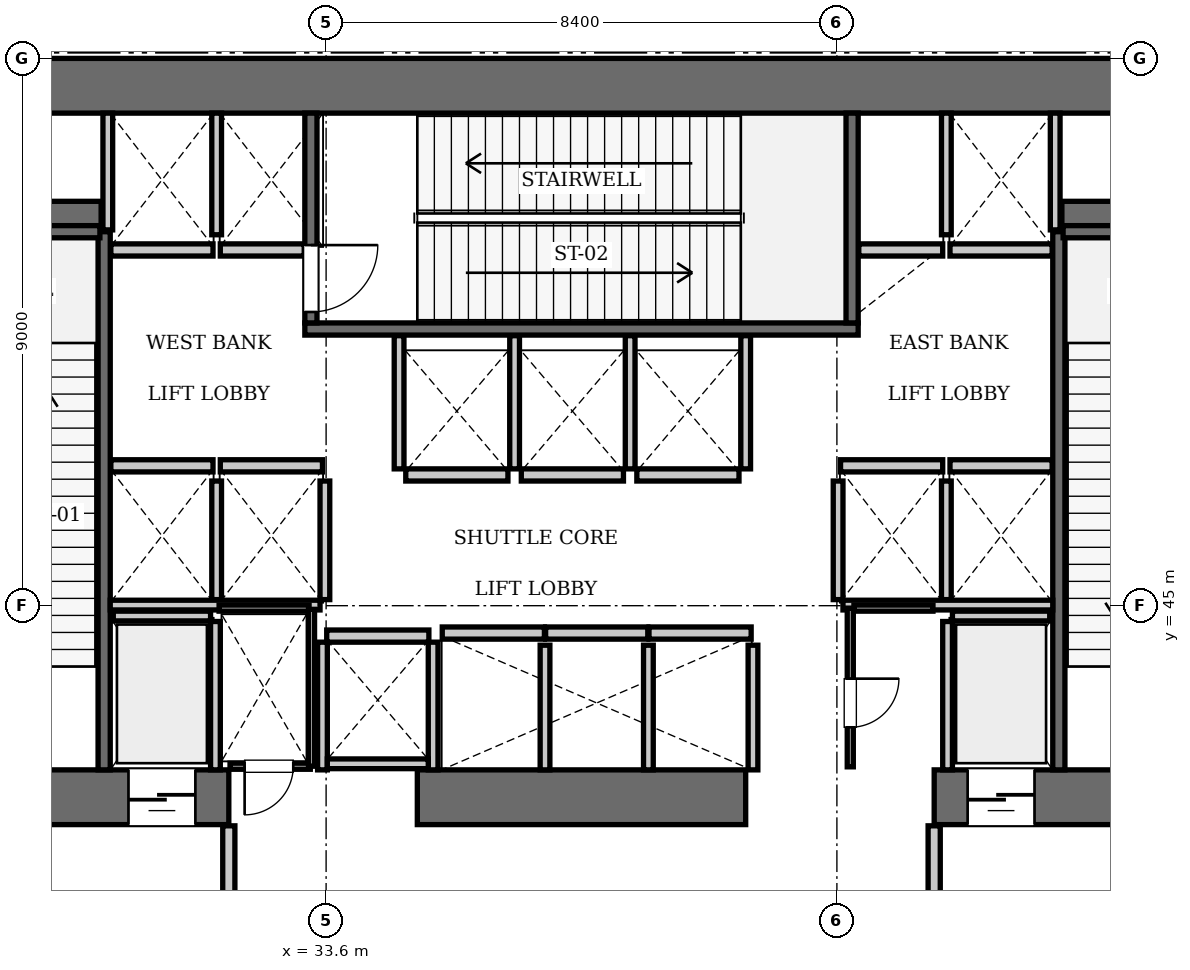
"""IFC4 building model, lengths in metres.
Left out: names, types, materials, properties, quantities, classifications, styles, units other than length and angle.
Written with IfcOpenShell. Run it as: python <this file> out.ifc"""

import sys

from ifc_helpers import new_model, si_unit, direction, frame, frame_2d, origin, place, context, subcontext, project, spatial, rectangle, extrude, element, fill, save


model = new_model("IFC4")
c1 = context("Model", 3, precision=1e-05, world=origin(), true_north=direction((0.0, 1.0)))
c2 = subcontext(c1, "Body", "Model", "MODEL_VIEW")
j1 = project(units=[si_unit("LENGTHUNIT", "METRE"), si_unit("PLANEANGLEUNIT", "RADIAN")], contexts=[c1])
p1 = place(None, origin())
s1 = spatial("IfcSite", under=j1, at=p1, CompositionType="ELEMENT")
p2 = place(p1, origin())
s2 = spatial("IfcBuilding", under=s1, at=p2, CompositionType="ELEMENT")
p3 = place(p2, frame((0.0, 0.0, 115.5)))
s3 = spatial("IfcBuildingStorey", under=s2, at=p3, CompositionType="ELEMENT", Elevation=115.5)
p4 = place(p3, frame((25.2, 53.55, 0.0), z_axis=(0.0, 0.0, 1.0), x_axis=(1.0, 0.0, 0.0)))
e1 = element("IfcWall", 1, at=p4, inside=s3, PredefinedType="SHEAR", context=c2, shape_type="SweptSolid", body=[
    extrude(rectangle(XDim=25.2, YDim=0.9, at=frame_2d((12.6, 0.0))), origin(), (0.0, 0.0, 1.0), 7.0),
])
p5 = place(p3, frame((25.2, 41.85, 0.0), z_axis=(0.0, 0.0, 1.0), x_axis=(1.0, 0.0, 0.0)))
e2 = element("IfcWall", 2, at=p5, inside=s3, PredefinedType="SHEAR", context=c2, shape_type="SweptSolid", body=[
    extrude(rectangle(XDim=6.8, YDim=0.9, at=frame_2d((3.4, 0.0))), origin(), (0.0, 0.0, 1.0), 7.0),
])
p6 = place(p5, frame((1.65, 0.0, 0.0)))
e3 = element("IfcOpeningElement", 3, at=p6, cuts=e2, PredefinedType="OPENING", context=c2, shape_type="SweptSolid", body=[
    extrude(rectangle(XDim=1.15, YDim=2.15, at=frame_2d((0.575, 1.075))), frame((0.0, 0.46, 0.0), z_axis=(0.0, -1.0, 0.0), x_axis=(1.0, 0.0, 0.0)), (0.0, 0.0, 1.0), 0.92),
])
p7 = place(p5, frame((5.15, 0.0, 0.0)))
e4 = element("IfcOpeningElement", 4, at=p7, cuts=e2, PredefinedType="OPENING", context=c2, shape_type="SweptSolid", body=[
    extrude(rectangle(XDim=1.1, YDim=2.2, at=frame_2d((0.55, 1.1))), frame((0.0, 0.46, 0.0), z_axis=(0.0, -1.0, 0.0), x_axis=(1.0, 0.0, 0.0)), (0.0, 0.0, 1.0), 0.92),
])
p8 = place(p3, frame((35.1, 41.85, 0.0), z_axis=(0.0, 0.0, 1.0), x_axis=(1.0, 0.0, 0.0)))
e5 = element("IfcWall", 5, at=p8, inside=s3, PredefinedType="SHEAR", context=c2, shape_type="SweptSolid", body=[
    extrude(rectangle(XDim=5.4, YDim=0.9, at=frame_2d((2.7, 0.0))), origin(), (0.0, 0.0, 1.0), 7.0),
])
p9 = place(p3, frame((43.6, 41.85, 0.0), z_axis=(0.0, 0.0, 1.0), x_axis=(1.0, 0.0, 0.0)))
e6 = element("IfcWall", 6, at=p9, inside=s3, PredefinedType="SHEAR", context=c2, shape_type="SweptSolid", body=[
    extrude(rectangle(XDim=6.8, YDim=0.9, at=frame_2d((3.4, 0.0))), origin(), (0.0, 0.0, 1.0), 7.0),
])
p10 = place(p9, frame((3.9, 0.0, 0.0)))
e7 = element("IfcOpeningElement", 7, at=p10, cuts=e6, PredefinedType="OPENING", context=c2, shape_type="SweptSolid", body=[
    extrude(rectangle(XDim=1.15, YDim=2.15, at=frame_2d((0.575, 1.075))), frame((0.0, 0.46, 0.0), z_axis=(0.0, -1.0, 0.0), x_axis=(1.0, 0.0, 0.0)), (0.0, 0.0, 1.0), 0.92),
])
p11 = place(p9, frame((0.55, 0.0, 0.0)))
e8 = element("IfcOpeningElement", 8, at=p11, cuts=e6, PredefinedType="OPENING", context=c2, shape_type="SweptSolid", body=[
    extrude(rectangle(XDim=1.1, YDim=2.2, at=frame_2d((0.55, 1.1))), frame((0.0, 0.46, 0.0), z_axis=(0.0, -1.0, 0.0), x_axis=(1.0, 0.0, 0.0)), (0.0, 0.0, 1.0), 0.92),
])
p12 = place(p3, frame((26.1, 51.4, 0.0), z_axis=(0.0, 0.0, 1.0), x_axis=(1.0, 0.0, 0.0)))
e9 = element("IfcWall", 9, at=p12, inside=s3, PredefinedType="SHEAR", context=c2, shape_type="SweptSolid", body=[
    extrude(rectangle(XDim=3.8, YDim=0.5, at=frame_2d((1.9, 0.0))), origin(), (0.0, 0.0, 1.0), 7.0),
])
p13 = place(p3, frame((45.7, 51.4, 0.0), z_axis=(0.0, 0.0, 1.0), x_axis=(1.0, 0.0, 0.0)))
e10 = element("IfcWall", 10, at=p13, inside=s3, PredefinedType="SHEAR", context=c2, shape_type="SweptSolid", body=[
    extrude(rectangle(XDim=3.8, YDim=0.5, at=frame_2d((1.9, 0.0))), origin(), (0.0, 0.0, 1.0), 7.0),
])
p14 = place(p3, frame((29.95, 42.3, 0.0), z_axis=(0.0, 0.0, 1.0), x_axis=(0.0, 1.0, 0.0)))
e11 = element("IfcWall", 11, at=p14, inside=s3, PredefinedType="SOLIDWALL", context=c2, shape_type="SweptSolid", body=[
    extrude(rectangle(XDim=8.85, YDim=0.2, at=frame_2d((4.425, 0.0))), origin(), (0.0, 0.0, 1.0), 6.76),
])
p15 = place(p3, frame((26.38, 51.15, 0.0), z_axis=(0.0, 0.0, 1.0), x_axis=(1.0, 0.0, 0.0)))
e12 = element("IfcWall", 12, at=p15, inside=s3, PredefinedType="SOLIDWALL", context=c2, shape_type="SweptSolid", body=[
    extrude(rectangle(XDim=3.5, YDim=0.2, at=frame_2d((1.75, 0.0))), origin(), (0.0, 0.0, 1.0), 6.76),
])
p16 = place(p3, frame((33.25, 49.55, 0.0), z_axis=(0.0, 0.0, 1.0), x_axis=(1.0, 0.0, 0.0)))
e13 = element("IfcWall", 13, at=p16, inside=s3, PredefinedType="SOLIDWALL", context=c2, shape_type="SweptSolid", body=[
    extrude(rectangle(XDim=9.1, YDim=0.2, at=frame_2d((4.55, 0.0))), origin(), (0.0, 0.0, 1.0), 6.76),
])
p17 = place(p3, frame((42.25, 49.65, 0.0), z_axis=(0.0, 0.0, 1.0), x_axis=(0.0, 1.0, 0.0)))
e14 = element("IfcWall", 14, at=p17, inside=s3, PredefinedType="SOLIDWALL", context=c2, shape_type="SweptSolid", body=[
    extrude(rectangle(XDim=3.45, YDim=0.2, at=frame_2d((1.725, 0.0))), origin(), (0.0, 0.0, 1.0), 6.76),
])
p18 = place(p3, frame((33.35, 49.65, 0.0), z_axis=(0.0, 0.0, 1.0), x_axis=(0.0, 1.0, 0.0)))
e15 = element("IfcWall", 15, at=p18, inside=s3, PredefinedType="SOLIDWALL", context=c2, shape_type="SweptSolid", body=[
    extrude(rectangle(XDim=3.45, YDim=0.2, at=frame_2d((1.725, 0.0))), origin(), (0.0, 0.0, 1.0), 6.76),
])
p19 = place(p18, frame((0.18, 0.0, 0.0)))
e16 = element("IfcOpeningElement", 16, at=p19, cuts=e15, PredefinedType="OPENING", context=c2, shape_type="SweptSolid", body=[
    extrude(rectangle(XDim=1.1, YDim=2.15, at=frame_2d((0.55, 1.075))), frame((0.0, 0.11, 0.0), z_axis=(0.0, -1.0, 0.0), x_axis=(1.0, 0.0, 0.0)), (0.0, 0.0, 1.0), 0.22),
])
p20 = place(p3, frame((45.65, 42.3, 0.0), z_axis=(0.0, 0.0, 1.0), x_axis=(0.0, 1.0, 0.0)))
e17 = element("IfcWall", 17, at=p20, inside=s3, PredefinedType="SOLIDWALL", context=c2, shape_type="SweptSolid", body=[
    extrude(rectangle(XDim=8.85, YDim=0.2, at=frame_2d((4.425, 0.0))), origin(), (0.0, 0.0, 1.0), 6.76),
])
p21 = place(p3, frame((45.72, 51.15, 0.0), z_axis=(0.0, 0.0, 1.0), x_axis=(1.0, 0.0, 0.0)))
e18 = element("IfcWall", 18, at=p21, inside=s3, PredefinedType="SOLIDWALL", context=c2, shape_type="SweptSolid", body=[
    extrude(rectangle(XDim=3.5, YDim=0.2, at=frame_2d((1.75, 0.0))), origin(), (0.0, 0.0, 1.0), 6.76),
])
for number, where, z_axis, x_axis in (
    (19, (30.06, 47.3, 0.0), (0.0, 0.0, 1.0), (1.0, 0.0, 0.0)),
    (20, (31.86, 47.3, 0.0), (0.0, 0.0, 1.0), (1.0, 0.0, 0.0)),
    (21, (30.06, 50.85, 0.0), (0.0, 0.0, 1.0), (1.0, 0.0, 0.0)),
):
    element("IfcWall", number, at=place(p3, frame(where, z_axis=z_axis, x_axis=x_axis)), inside=s3, PredefinedType="SOLIDWALL", context=c2, shape_type="SweptSolid", body=[
        extrude(rectangle(XDim=1.68, YDim=0.2, at=frame_2d((0.84, 0.0))), origin(), (0.0, 0.0, 1.0), 6.76),
    ])
p22 = place(p3, frame((31.86, 50.85, 0.0), z_axis=(0.0, 0.0, 1.0), x_axis=(1.0, 0.0, 0.0)))
e22 = element("IfcWall", 22, at=p22, inside=s3, PredefinedType="SOLIDWALL", context=c2, shape_type="SweptSolid", body=[
    extrude(rectangle(XDim=1.38, YDim=0.2, at=frame_2d((0.69, 0.0))), origin(), (0.0, 0.0, 1.0), 6.76),
])
for number, where, z_axis, x_axis in (
    (23, (42.06, 47.3, 0.0), (0.0, 0.0, 1.0), (1.0, 0.0, 0.0)),
    (24, (43.86, 47.3, 0.0), (0.0, 0.0, 1.0), (1.0, 0.0, 0.0)),
):
    element("IfcWall", number, at=place(p3, frame(where, z_axis=z_axis, x_axis=x_axis)), inside=s3, PredefinedType="SOLIDWALL", context=c2, shape_type="SweptSolid", body=[
        extrude(rectangle(XDim=1.68, YDim=0.2, at=frame_2d((0.84, 0.0))), origin(), (0.0, 0.0, 1.0), 6.76),
    ])
p23 = place(p3, frame((42.36, 50.85, 0.0), z_axis=(0.0, 0.0, 1.0), x_axis=(1.0, 0.0, 0.0)))
e25 = element("IfcWall", 25, at=p23, inside=s3, PredefinedType="SOLIDWALL", context=c2, shape_type="SweptSolid", body=[
    extrude(rectangle(XDim=1.38, YDim=0.2, at=frame_2d((0.69, 0.0))), origin(), (0.0, 0.0, 1.0), 6.76),
])
for number, where, z_axis, x_axis in (
    (26, (43.86, 50.85, 0.0), (0.0, 0.0, 1.0), (1.0, 0.0, 0.0)),
    (27, (35.51, 44.55, 0.0), (0.0, 0.0, 1.0), (1.0, 0.0, 0.0)),
    (28, (37.21, 44.55, 0.0), (0.0, 0.0, 1.0), (1.0, 0.0, 0.0)),
):
    element("IfcWall", number, at=place(p3, frame(where, z_axis=z_axis, x_axis=x_axis)), inside=s3, PredefinedType="SOLIDWALL", context=c2, shape_type="SweptSolid", body=[
        extrude(rectangle(XDim=1.68, YDim=0.2, at=frame_2d((0.84, 0.0))), origin(), (0.0, 0.0, 1.0), 6.76),
    ])
for number, where, z_axis, x_axis in (
    (29, (38.91, 44.55, 0.0), (0.0, 0.0, 1.0), (1.0, 0.0, 0.0)),
    (30, (34.91, 47.15, 0.0), (0.0, 0.0, 1.0), (1.0, 0.0, 0.0)),
):
    element("IfcWall", number, at=place(p3, frame(where, z_axis=z_axis, x_axis=x_axis)), inside=s3, PredefinedType="SOLIDWALL", context=c2, shape_type="SweptSolid", body=[
        extrude(rectangle(XDim=1.68, YDim=0.2, at=frame_2d((0.84, 0.0))), origin(), (0.0, 0.0, 1.0), 6.76),
    ])
for number, where, z_axis, x_axis in (
    (31, (36.81, 47.15, 0.0), (0.0, 0.0, 1.0), (1.0, 0.0, 0.0)),
    (32, (38.71, 47.15, 0.0), (0.0, 0.0, 1.0), (1.0, 0.0, 0.0)),
    (33, (33.61, 44.5, 0.0), (0.0, 0.0, 1.0), (1.0, 0.0, 0.0)),
):
    element("IfcWall", number, at=place(p3, frame(where, z_axis=z_axis, x_axis=x_axis)), inside=s3, PredefinedType="SOLIDWALL", context=c2, shape_type="SweptSolid", body=[
        extrude(rectangle(XDim=1.68, YDim=0.2, at=frame_2d((0.84, 0.0))), origin(), (0.0, 0.0, 1.0), 6.76),
    ])
p24 = place(p3, frame((30.1, 44.83, 0.0), z_axis=(0.0, 0.0, 1.0), x_axis=(1.0, 0.0, 0.0)))
e34 = element("IfcWall", 34, at=p24, inside=s3, PredefinedType="SOLIDWALL", context=c2, shape_type="SweptSolid", body=[
    extrude(rectangle(XDim=1.6, YDim=0.16, at=frame_2d((0.8, 0.0))), origin(), (0.0, 0.0, 1.0), 6.76),
])
p25 = place(p3, frame((31.78, 42.3, 0.0), z_axis=(0.0, 0.0, 1.0), x_axis=(0.0, 1.0, 0.0)))
e35 = element("IfcWall", 35, at=p25, inside=s3, PredefinedType="SOLIDWALL", context=c2, shape_type="SweptSolid", body=[
    extrude(rectangle(XDim=2.44, YDim=0.16, at=frame_2d((1.22, 0.0))), origin(), (0.0, 0.0, 1.0), 6.76),
])
p26 = place(p3, frame((43.9, 44.83, 0.0), z_axis=(0.0, 0.0, 1.0), x_axis=(1.0, 0.0, 0.0)))
e36 = element("IfcWall", 36, at=p26, inside=s3, PredefinedType="SOLIDWALL", context=c2, shape_type="SweptSolid", body=[
    extrude(rectangle(XDim=1.6, YDim=0.16, at=frame_2d((0.8, 0.0))), origin(), (0.0, 0.0, 1.0), 6.76),
])
p27 = place(p3, frame((43.82, 42.3, 0.0), z_axis=(0.0, 0.0, 1.0), x_axis=(0.0, 1.0, 0.0)))
e37 = element("IfcWall", 37, at=p27, inside=s3, PredefinedType="SOLIDWALL", context=c2, shape_type="SweptSolid", body=[
    extrude(rectangle(XDim=2.44, YDim=0.16, at=frame_2d((1.22, 0.0))), origin(), (0.0, 0.0, 1.0), 6.76),
])
for number, where, z_axis, x_axis in (
    (38, (31.8, 45.1, 0.0), (0.0, 0.0, 1.0), (0.0, 1.0, 0.0)),
    (39, (33.58, 45.1, 0.0), (0.0, 0.0, 1.0), (0.0, 1.0, 0.0)),
):
    element("IfcWall", number, at=place(p3, frame(where, z_axis=z_axis, x_axis=x_axis)), inside=s3, PredefinedType="SOLIDWALL", context=c2, shape_type="SweptSolid", body=[
        extrude(rectangle(XDim=1.95, YDim=0.16, at=frame_2d((0.975, 0.0))), origin(), (0.0, 0.0, 1.0), 6.76),
    ])
p28 = place(p3, frame((30.05, 45.01, 0.0), z_axis=(0.0, 0.0, 1.0), x_axis=(1.0, 0.0, 0.0)))
e40 = element("IfcWall", 40, at=p28, inside=s3, PredefinedType="SOLIDWALL", context=c2, shape_type="SweptSolid", body=[
    extrude(rectangle(XDim=3.45, YDim=0.16, at=frame_2d((1.725, 0.0))), origin(), (0.0, 0.0, 1.0), 6.76),
])
p29 = place(p3, frame((30.01, 51.18, 0.0), z_axis=(0.0, 0.0, 1.0), x_axis=(0.0, 1.0, 0.0)))
e41 = element("IfcWall", 41, at=p29, inside=s3, PredefinedType="SOLIDWALL", context=c2, shape_type="SweptSolid", body=[
    extrude(rectangle(XDim=1.92, YDim=0.16, at=frame_2d((0.96, 0.0))), origin(), (0.0, 0.0, 1.0), 6.76),
])
p30 = place(p3, frame((31.8, 51.1, 0.0), z_axis=(0.0, 0.0, 1.0), x_axis=(0.0, 1.0, 0.0)))
e42 = element("IfcWall", 42, at=p30, inside=s3, PredefinedType="SOLIDWALL", context=c2, shape_type="SweptSolid", body=[
    extrude(rectangle(XDim=2.0, YDim=0.16, at=frame_2d((1.0, 0.0))), origin(), (0.0, 0.0, 1.0), 6.76),
])
for number, where, z_axis, x_axis in (
    (43, (42.02, 45.1, 0.0), (0.0, 0.0, 1.0), (0.0, 1.0, 0.0)),
    (44, (43.8, 45.1, 0.0), (0.0, 0.0, 1.0), (0.0, 1.0, 0.0)),
):
    element("IfcWall", number, at=place(p3, frame(where, z_axis=z_axis, x_axis=x_axis)), inside=s3, PredefinedType="SOLIDWALL", context=c2, shape_type="SweptSolid", body=[
        extrude(rectangle(XDim=1.95, YDim=0.16, at=frame_2d((0.975, 0.0))), origin(), (0.0, 0.0, 1.0), 6.76),
    ])
p31 = place(p3, frame((42.1, 45.01, 0.0), z_axis=(0.0, 0.0, 1.0), x_axis=(1.0, 0.0, 0.0)))
e45 = element("IfcWall", 45, at=p31, inside=s3, PredefinedType="SOLIDWALL", context=c2, shape_type="SweptSolid", body=[
    extrude(rectangle(XDim=3.45, YDim=0.16, at=frame_2d((1.725, 0.0))), origin(), (0.0, 0.0, 1.0), 6.76),
])
p32 = place(p3, frame((45.59, 51.18, 0.0), z_axis=(0.0, 0.0, 1.0), x_axis=(0.0, 1.0, 0.0)))
e46 = element("IfcWall", 46, at=p32, inside=s3, PredefinedType="SOLIDWALL", context=c2, shape_type="SweptSolid", body=[
    extrude(rectangle(XDim=1.92, YDim=0.16, at=frame_2d((0.96, 0.0))), origin(), (0.0, 0.0, 1.0), 6.76),
])
p33 = place(p3, frame((43.8, 51.1, 0.0), z_axis=(0.0, 0.0, 1.0), x_axis=(0.0, 1.0, 0.0)))
e47 = element("IfcWall", 47, at=p33, inside=s3, PredefinedType="SOLIDWALL", context=c2, shape_type="SweptSolid", body=[
    extrude(rectangle(XDim=2.0, YDim=0.16, at=frame_2d((1.0, 0.0))), origin(), (0.0, 0.0, 1.0), 6.76),
])
for number, where, z_axis, x_axis in (
    (48, (37.2, 42.3, 0.0), (0.0, 0.0, 1.0), (0.0, 1.0, 0.0)),
    (49, (38.9, 42.3, 0.0), (0.0, 0.0, 1.0), (0.0, 1.0, 0.0)),
    (50, (40.62, 42.3, 0.0), (0.0, 0.0, 1.0), (0.0, 1.0, 0.0)),
):
    element("IfcWall", number, at=place(p3, frame(where, z_axis=z_axis, x_axis=x_axis)), inside=s3, PredefinedType="SOLIDWALL", context=c2, shape_type="SweptSolid", body=[
        extrude(rectangle(XDim=2.05, YDim=0.16, at=frame_2d((1.025, 0.0))), origin(), (0.0, 0.0, 1.0), 6.76),
    ])
for number, where, z_axis, x_axis in (
    (51, (34.8, 47.25, 0.0), (0.0, 0.0, 1.0), (0.0, 1.0, 0.0)),
    (52, (36.7, 47.25, 0.0), (0.0, 0.0, 1.0), (0.0, 1.0, 0.0)),
    (53, (38.6, 47.25, 0.0), (0.0, 0.0, 1.0), (0.0, 1.0, 0.0)),
    (54, (40.5, 47.25, 0.0), (0.0, 0.0, 1.0), (0.0, 1.0, 0.0)),
):
    element("IfcWall", number, at=place(p3, frame(where, z_axis=z_axis, x_axis=x_axis)), inside=s3, PredefinedType="SOLIDWALL", context=c2, shape_type="SweptSolid", body=[
        extrude(rectangle(XDim=2.19, YDim=0.16, at=frame_2d((1.095, 0.0))), origin(), (0.0, 0.0, 1.0), 6.76),
    ])
for number, where, z_axis, x_axis in (
    (55, (33.54, 42.3, 0.0), (0.0, 0.0, 1.0), (0.0, 1.0, 0.0)),
    (56, (35.36, 42.3, 0.0), (0.0, 0.0, 1.0), (0.0, 1.0, 0.0)),
):
    element("IfcWall", number, at=place(p3, frame(where, z_axis=z_axis, x_axis=x_axis)), inside=s3, PredefinedType="SOLIDWALL", context=c2, shape_type="SweptSolid", body=[
        extrude(rectangle(XDim=2.1, YDim=0.16, at=frame_2d((1.05, 0.0))), origin(), (0.0, 0.0, 1.0), 6.76),
    ])
p34 = place(p3, frame((33.62, 42.4, 0.0), z_axis=(0.0, 0.0, 1.0), x_axis=(1.0, 0.0, 0.0)))
e57 = element("IfcWall", 57, at=p34, inside=s3, PredefinedType="SOLIDWALL", context=c2, shape_type="SweptSolid", body=[
    extrude(rectangle(XDim=1.66, YDim=0.16, at=frame_2d((0.83, 0.0))), origin(), (0.0, 0.0, 1.0), 6.76),
])
for number, where, z_axis, x_axis in (
    (58, (32.0, 38.31, 0.0), (0.0, 0.0, 1.0), (0.0, 1.0, 0.0)),
    (59, (43.6, 38.31, 0.0), (0.0, 0.0, 1.0), (0.0, 1.0, 0.0)),
):
    element("IfcWall", number, at=place(p3, frame(where, z_axis=z_axis, x_axis=x_axis)), inside=s3, PredefinedType="PARTITIONING", context=c2, shape_type="SweptSolid", body=[
        extrude(rectangle(XDim=3.07, YDim=0.2, at=frame_2d((1.535, 0.0))), origin(), (0.0, 0.0, 1.0), 6.76),
    ])
p35 = place(p3, frame((32.02, 42.36, 0.0), z_axis=(0.0, 0.0, 1.0), x_axis=(1.0, 0.0, 0.0)))
e60 = element("IfcWall", 60, at=p35, inside=s3, PredefinedType="PARTITIONING", context=c2, shape_type="SweptSolid", body=[
    extrude(rectangle(XDim=1.32, YDim=0.1, at=frame_2d((0.66, 0.0))), origin(), (0.0, 0.0, 1.0), 6.76),
])
p36 = place(p35, frame((0.24, 0.0, 0.0)))
e61 = element("IfcOpeningElement", 61, at=p36, cuts=e60, PredefinedType="OPENING", context=c2, shape_type="SweptSolid", body=[
    extrude(rectangle(XDim=0.8, YDim=2.05, at=frame_2d((0.4, 1.025))), frame((0.0, 0.06, 0.0), z_axis=(0.0, -1.0, 0.0), x_axis=(1.0, 0.0, 0.0)), (0.0, 0.0, 1.0), 0.12),
])
p37 = place(p3, frame((31.84, 44.96, 0.0), z_axis=(0.0, 0.0, 1.0), x_axis=(1.0, 0.0, 0.0)))
e62 = element("IfcWall", 62, at=p37, inside=s3, PredefinedType="PARTITIONING", context=c2, shape_type="SweptSolid", body=[
    extrude(rectangle(XDim=1.48, YDim=0.1, at=frame_2d((0.74, 0.0))), origin(), (0.0, 0.0, 1.0), 6.76),
])
p38 = place(p3, frame((33.36, 42.36, 0.0), z_axis=(0.0, 0.0, 1.0), x_axis=(0.0, 1.0, 0.0)))
e63 = element("IfcWall", 63, at=p38, inside=s3, PredefinedType="PARTITIONING", context=c2, shape_type="SweptSolid", body=[
    extrude(rectangle(XDim=2.58, YDim=0.1, at=frame_2d((1.29, 0.0))), origin(), (0.0, 0.0, 1.0), 6.76),
])
p39 = place(p3, frame((42.22, 42.35, 0.0), z_axis=(0.0, 0.0, 1.0), x_axis=(0.0, 1.0, 0.0)))
e64 = element("IfcWall", 64, at=p39, inside=s3, PredefinedType="PARTITIONING", context=c2, shape_type="SweptSolid", body=[
    extrude(rectangle(XDim=2.61, YDim=0.1, at=frame_2d((1.305, 0.0))), origin(), (0.0, 0.0, 1.0), 6.76),
])
p40 = place(p39, frame((0.65, 0.0, 0.0)))
e65 = element("IfcOpeningElement", 65, at=p40, cuts=e64, PredefinedType="OPENING", context=c2, shape_type="SweptSolid", body=[
    extrude(rectangle(XDim=0.8, YDim=2.05, at=frame_2d((0.4, 1.025))), frame((0.0, 0.06, 0.0), z_axis=(0.0, -1.0, 0.0), x_axis=(1.0, 0.0, 0.0)), (0.0, 0.0, 1.0), 0.12),
])
p41 = place(p3, frame((42.28, 44.96, 0.0), z_axis=(0.0, 0.0, 1.0), x_axis=(1.0, 0.0, 0.0)))
e66 = element("IfcWall", 66, at=p41, inside=s3, PredefinedType="PARTITIONING", context=c2, shape_type="SweptSolid", body=[
    extrude(rectangle(XDim=1.3, YDim=0.1, at=frame_2d((0.65, 0.0))), origin(), (0.0, 0.0, 1.0), 6.76),
])
p42 = place(p19, frame((1.1, 0.0, 0.0), z_axis=(0.0, 0.0, 1.0), x_axis=(-1.0, 0.0, 0.0)))
e67 = element("IfcDoor", 67, at=p42, inside=s3, OperationType="SINGLE_SWING_LEFT", PredefinedType="DOOR", context=c2, shape_type="SweptSolid", body=[
    extrude(rectangle(XDim=1.1, YDim=2.15, at=frame_2d((0.55, 1.075))), frame((0.0, 0.025, 0.0), z_axis=(0.0, -1.0, 0.0), x_axis=(1.0, 0.0, 0.0)), (0.0, 0.0, 1.0), 0.05),
])
fill(e16, e67)
p43 = place(p7, frame((1.1, 0.0, 0.0), z_axis=(0.0, 0.0, 1.0), x_axis=(-1.0, 0.0, 0.0)))
e68 = element("IfcDoor", 68, at=p43, inside=s3, OperationType="SLIDING_TO_LEFT", PredefinedType="DOOR", context=c2, shape_type="SweptSolid", body=[
    extrude(rectangle(XDim=1.1, YDim=2.2, at=frame_2d((0.55, 1.1))), frame((0.0, 0.025, 0.0), z_axis=(0.0, -1.0, 0.0), x_axis=(1.0, 0.0, 0.0)), (0.0, 0.0, 1.0), 0.05),
])
fill(e4, e68)
p44 = place(p11, frame((1.1, 0.0, 0.0), z_axis=(0.0, 0.0, 1.0), x_axis=(-1.0, 0.0, 0.0)))
e69 = element("IfcDoor", 69, at=p44, inside=s3, OperationType="SLIDING_TO_LEFT", PredefinedType="DOOR", context=c2, shape_type="SweptSolid", body=[
    extrude(rectangle(XDim=1.1, YDim=2.2, at=frame_2d((0.55, 1.1))), frame((0.0, 0.025, 0.0), z_axis=(0.0, -1.0, 0.0), x_axis=(1.0, 0.0, 0.0)), (0.0, 0.0, 1.0), 0.05),
])
fill(e8, e69)
p45 = place(p36, frame((0.8, 0.0, 0.0), z_axis=(0.0, 0.0, 1.0), x_axis=(-1.0, 0.0, 0.0)))
e70 = element("IfcDoor", 70, at=p45, inside=s3, OperationType="SINGLE_SWING_RIGHT", PredefinedType="DOOR", context=c2, shape_type="SweptSolid", body=[
    extrude(rectangle(XDim=0.8, YDim=2.05, at=frame_2d((0.4, 1.025))), frame((0.0, 0.025, 0.0), z_axis=(0.0, -1.0, 0.0), x_axis=(1.0, 0.0, 0.0)), (0.0, 0.0, 1.0), 0.05),
])
fill(e61, e70)
p46 = place(p40, frame((0.8, 0.0, 0.0), z_axis=(0.0, 0.0, 1.0), x_axis=(-1.0, 0.0, 0.0)))
e71 = element("IfcDoor", 71, at=p46, inside=s3, OperationType="SINGLE_SWING_LEFT", PredefinedType="DOOR", context=c2, shape_type="SweptSolid", body=[
    extrude(rectangle(XDim=0.8, YDim=2.05, at=frame_2d((0.4, 1.025))), frame((0.0, 0.025, 0.0), z_axis=(0.0, -1.0, 0.0), x_axis=(1.0, 0.0, 0.0)), (0.0, 0.0, 1.0), 0.05),
])
fill(e65, e71)
save(model, sys.argv[1])
